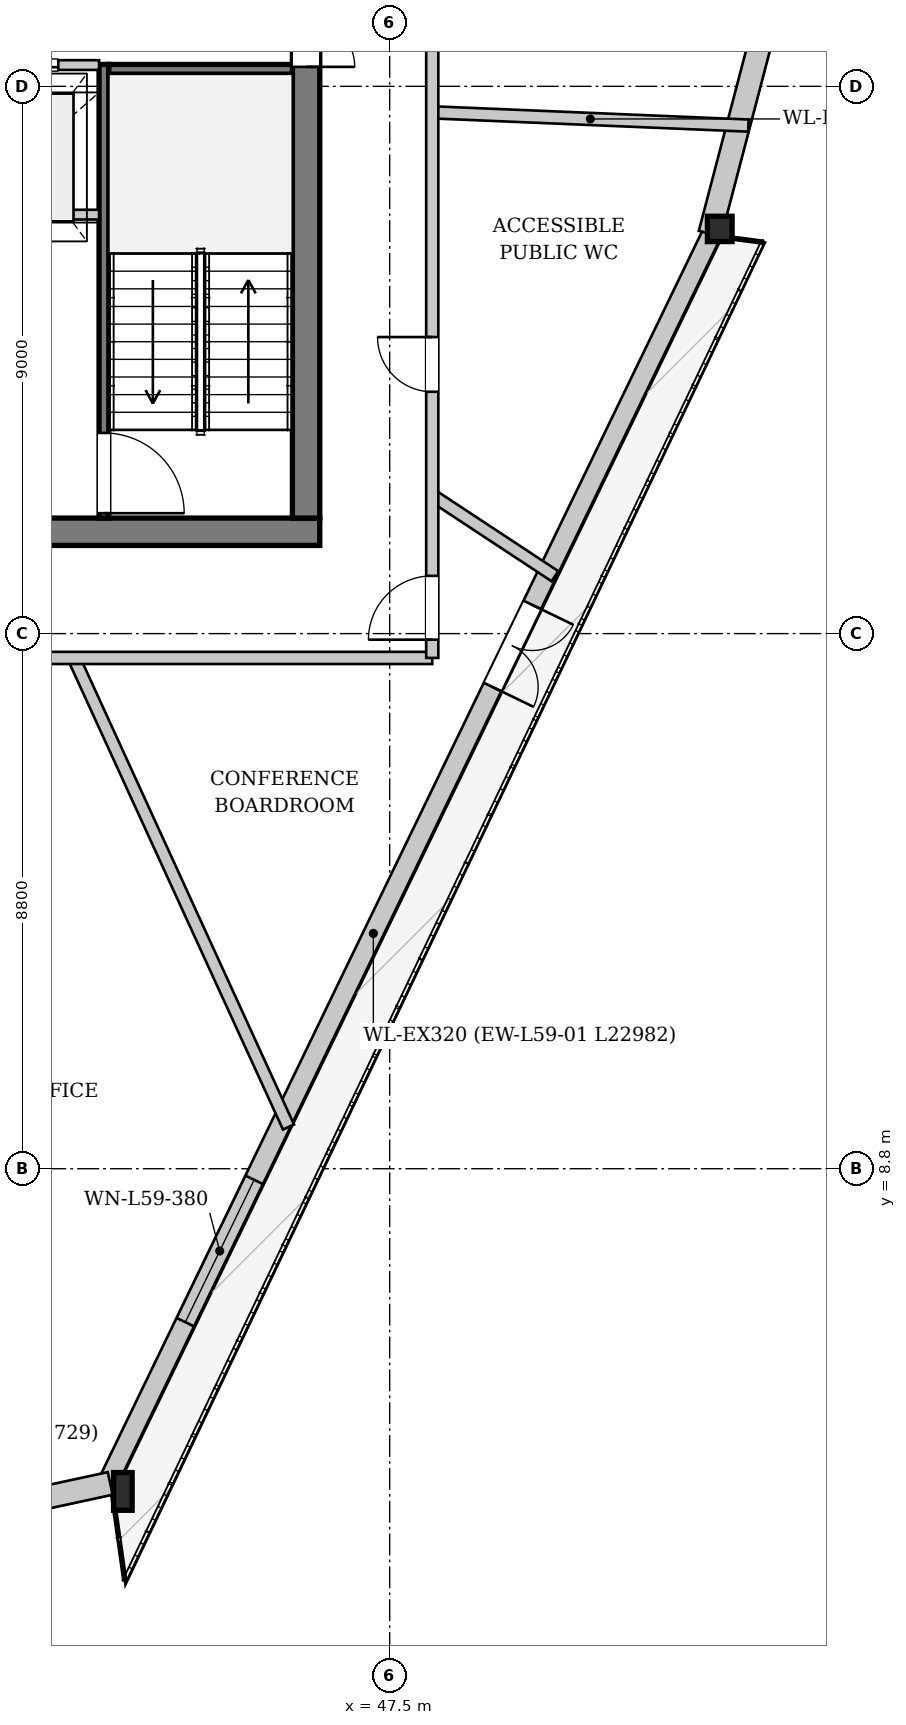
"""IFC4 building model, lengths in metres.
Left out: names, types, materials, properties, quantities, classifications, styles, units other than length and angle.
Written with IfcOpenShell. Run it as: python <this file> out.ifc"""

import sys

from ifc_helpers import new_model, si_unit, direction, frame, frame_2d, origin, origin_2d, place, context, subcontext, project, spatial, rectangle, i_section, extrude, source, transform, mapped, element, fill, save


model = new_model("IFC4")
c1 = context("Model", 3, precision=1e-05, world=origin(), true_north=direction((0.0, 1.0)))
c2 = subcontext(c1, "Body", "Model", "MODEL_VIEW")
j1 = project(units=[si_unit("LENGTHUNIT", "METRE"), si_unit("PLANEANGLEUNIT", "RADIAN")], contexts=[c1])
p1 = place(None, origin())
s1 = spatial("IfcSite", under=j1, at=p1, CompositionType="ELEMENT")
p2 = place(p1, origin())
s2 = spatial("IfcBuilding", under=s1, at=p2, CompositionType="ELEMENT")
p3 = place(p2, frame((0.0, 0.0, 223.8)))
s3 = spatial("IfcBuildingStorey", under=s2, at=p3, CompositionType="ELEMENT", Elevation=223.8)
m1 = source(origin(), c2, "Body", "SweptSolid", [
    extrude(i_section(OverallWidth=0.305, OverallDepth=0.62, WebThickness=0.021, FlangeThickness=0.04, at=origin_2d()), origin(), (0.0, 0.0, 1.0), 3.403),
])
p4 = place(p3, frame((42.944, 3.439, 0.0), z_axis=(0.098707447122, 0.031850368112, 0.99460665287), x_axis=(-0.307083610191, 0.951682539691, 0.0)))
e1 = element("IfcColumn", 1, at=p4, inside=s3, PredefinedType="COLUMN", context=c2, shape_type="MappedRepresentation", body=[
    mapped(m1, transform((0.0, 0.0, 0.0), x_axis=(1.0, 0.0, 0.0), y_axis=(0.0, 1.0, 0.0), z_axis=(0.0, 0.0, 1.0), scale=1.0)),
])
m2 = source(origin(), c2, "Body", "SweptSolid", [
    extrude(i_section(OverallWidth=0.406, OverallDepth=0.416, WebThickness=0.027, FlangeThickness=0.042, at=origin_2d()), origin(), (0.0, 0.0, 1.0), 3.395),
])
p5 = place(p3, frame((52.951, 24.127, 0.0), z_axis=(-0.013591343042, 0.075435549477, 0.997058049097), x_axis=(-0.984153867213, -0.177316569021, 0.0)))
e2 = element("IfcColumn", 2, at=p5, inside=s3, PredefinedType="COLUMN", context=c2, shape_type="MappedRepresentation", body=[
    mapped(m2, transform((0.0, 0.0, 0.0), x_axis=(1.0, 0.0, 0.0), y_axis=(0.0, 1.0, 0.0), z_axis=(0.0, 0.0, 1.0), scale=1.0)),
])
p6 = place(p3, frame((52.807, 24.197, 0.0), z_axis=(0.0, 0.0, 1.0), x_axis=(-0.435460131782, -0.900208016865, 0.0)))
e3 = element("IfcWall", 3, at=p6, inside=s3, PredefinedType="SOLIDWALL", context=c2, shape_type="SweptSolid", body=[
    extrude(rectangle(XDim=22.982, YDim=0.32, at=frame_2d((11.491, 0.0))), origin(), (0.0, 0.0, 1.0), 2.822),
])
p7 = place(p6, frame((6.804, 0.0, 0.0)))
e4 = element("IfcOpeningElement", 4, at=p7, cuts=e3, PredefinedType="OPENING", context=c2, shape_type="SweptSolid", body=[
    extrude(rectangle(XDim=1.5, YDim=2.3, at=frame_2d((0.75, 1.15))), frame((0.0, 0.17, 0.0), z_axis=(0.0, -1.0, 0.0), x_axis=(1.0, 0.0, 0.0)), (0.0, 0.0, 1.0), 0.34),
])
p8 = place(p6, frame((17.307, 0.0, 0.352)))
e5 = element("IfcOpeningElement", 5, at=p8, cuts=e3, PredefinedType="OPENING", context=c2, shape_type="SweptSolid", body=[
    extrude(rectangle(XDim=2.6, YDim=2.35, at=frame_2d((1.3, 1.175))), frame((0.0, 0.17, 0.0), z_axis=(0.0, -1.0, 0.0), x_axis=(1.0, 0.0, 0.0)), (0.0, 0.0, 1.0), 0.34),
])
p9 = place(p3, frame((42.903, 3.625, 0.0), z_axis=(0.0, 0.0, 1.0), x_axis=(-0.977406853857, -0.211366605765, 0.0)))
e6 = element("IfcWall", 6, at=p9, inside=s3, PredefinedType="SOLIDWALL", context=c2, shape_type="SweptSolid", body=[
    extrude(rectangle(XDim=3.729, YDim=0.38, at=frame_2d((1.864, 0.0))), origin(), (0.0, 0.0, 1.0), 2.822),
])
p10 = place(p3, frame((58.594, 46.407, 0.0), z_axis=(0.0, 0.0, 1.0), x_axis=(-0.253530518145, -0.96732738841, 0.0)))
e7 = element("IfcWall", 7, at=p10, inside=s3, PredefinedType="SOLIDWALL", context=c2, shape_type="SweptSolid", body=[
    extrude(rectangle(XDim=22.982, YDim=0.38, at=frame_2d((11.491, 0.0))), origin(), (0.0, 0.0, 1.0), 2.822),
])
p11 = place(p10, frame((5.335, 0.0, 0.452)))
e8 = element("IfcOpeningElement", 8, at=p11, cuts=e7, PredefinedType="OPENING", context=c2, shape_type="SweptSolid", body=[
    extrude(rectangle(XDim=2.2, YDim=2.25, at=frame_2d((1.1, 1.125))), frame((0.0, 0.2, 0.0), z_axis=(0.0, -1.0, 0.0), x_axis=(1.0, 0.0, 0.0)), (0.0, 0.0, 1.0), 0.4),
])
p12 = place(p10, frame((15.447, 0.0, 0.452)))
e9 = element("IfcOpeningElement", 9, at=p12, cuts=e7, PredefinedType="OPENING", context=c2, shape_type="SweptSolid", body=[
    extrude(rectangle(XDim=2.2, YDim=2.25, at=frame_2d((1.1, 1.125))), frame((0.0, 0.2, 0.0), z_axis=(0.0, -1.0, 0.0), x_axis=(1.0, 0.0, 0.0)), (0.0, 0.0, 1.0), 0.4),
])
p13 = place(p3, frame((46.35, 19.275, 0.0), z_axis=(0.0, 0.0, 1.0), x_axis=(-1.0, 0.0, 0.0)))
e10 = element("IfcWall", 10, at=p13, inside=s3, PredefinedType="SHEAR", context=c2, shape_type="SweptSolid", body=[
    extrude(rectangle(XDim=16.7, YDim=0.45, at=frame_2d((8.35, 0.0))), origin(), (0.0, 0.0, 1.0), 3.33),
])
p14 = place(p13, frame((4.55, 0.0, 0.0)))
e11 = element("IfcOpeningElement", 11, at=p14, cuts=e10, PredefinedType="OPENING", context=c2, shape_type="SweptSolid", body=[
    extrude(rectangle(XDim=1.12, YDim=2.25, at=frame_2d((0.56, 1.125))), frame((0.0, 0.235, 0.0), z_axis=(0.0, -1.0, 0.0), x_axis=(1.0, 0.0, 0.0)), (0.0, 0.0, 1.0), 0.47),
])
p15 = place(p13, frame((11.05, 0.0, 0.0)))
e12 = element("IfcOpeningElement", 12, at=p15, cuts=e10, PredefinedType="OPENING", context=c2, shape_type="SweptSolid", body=[
    extrude(rectangle(XDim=1.12, YDim=2.25, at=frame_2d((0.56, 1.125))), frame((0.0, 0.235, 0.0), z_axis=(0.0, -1.0, 0.0), x_axis=(1.0, 0.0, 0.0)), (0.0, 0.0, 1.0), 0.47),
])
p16 = place(p3, frame((46.125, 33.7, 0.0), z_axis=(0.0, 0.0, 1.0), x_axis=(0.0, -1.0, 0.0)))
e13 = element("IfcWall", 13, at=p16, inside=s3, PredefinedType="SHEAR", context=c2, shape_type="SweptSolid", body=[
    extrude(rectangle(XDim=14.2, YDim=0.45, at=frame_2d((7.1, 0.0))), origin(), (0.0, 0.0, 1.0), 3.33),
])
p17 = place(p16, frame((5.18, 0.0, 0.0)))
e14 = element("IfcOpeningElement", 14, at=p17, cuts=e13, PredefinedType="OPENING", context=c2, shape_type="SweptSolid", body=[
    extrude(rectangle(XDim=1.6, YDim=2.2, at=frame_2d((0.8, 1.1))), frame((0.0, 0.235, 0.0), z_axis=(0.0, -1.0, 0.0), x_axis=(1.0, 0.0, 0.0)), (0.0, 0.0, 1.0), 0.47),
])
p18 = place(p16, frame((2.05, 0.0, 0.0)))
e15 = element("IfcOpeningElement", 15, at=p18, cuts=e13, PredefinedType="OPENING", context=c2, shape_type="SweptSolid", body=[
    extrude(rectangle(XDim=0.95, YDim=2.1, at=frame_2d((0.475, 1.05))), frame((0.0, 0.235, 0.0), z_axis=(0.0, -1.0, 0.0), x_axis=(1.0, 0.0, 0.0)), (0.0, 0.0, 1.0), 0.47),
])
p19 = place(p3, frame((42.8, 26.96, 0.0), z_axis=(0.0, 0.0, 1.0), x_axis=(0.0, -1.0, 0.0)))
e16 = element("IfcWall", 16, at=p19, inside=s3, PredefinedType="PARTITIONING", context=c2, shape_type="SweptSolid", body=[
    extrude(rectangle(XDim=7.46, YDim=0.16, at=frame_2d((3.73, 0.0))), origin(), (0.0, 0.0, 1.0), 3.33),
])
p20 = place(p19, frame((6.06, 0.0, 0.0)))
e17 = element("IfcOpeningElement", 17, at=p20, cuts=e16, PredefinedType="OPENING", context=c2, shape_type="SweptSolid", body=[
    extrude(rectangle(XDim=1.32, YDim=2.2, at=frame_2d((0.66, 1.1))), frame((0.0, 0.09, 0.0), z_axis=(0.0, -1.0, 0.0), x_axis=(1.0, 0.0, 0.0)), (0.0, 0.0, 1.0), 0.18),
])
p21 = place(p3, frame((42.88, 26.88, 0.0), z_axis=(0.0, 0.0, 1.0), x_axis=(1.0, 0.0, 0.0)))
e18 = element("IfcWall", 18, at=p21, inside=s3, PredefinedType="PARTITIONING", context=c2, shape_type="SweptSolid", body=[
    extrude(rectangle(XDim=3.02, YDim=0.16, at=frame_2d((1.51, 0.0))), origin(), (0.0, 0.0, 1.0), 3.33),
])
p22 = place(p3, frame((33.28, 24.49, 0.0), z_axis=(0.0, 0.0, 1.0), x_axis=(1.0, 0.0, 0.0)))
e19 = element("IfcWall", 19, at=p22, inside=s3, PredefinedType="PARTITIONING", context=c2, shape_type="SweptSolid", body=[
    extrude(rectangle(XDim=9.44, YDim=0.16, at=frame_2d((4.72, 0.0))), origin(), (0.0, 0.0, 1.0), 3.33),
])
p23 = place(p3, frame((33.28, 26.95, 0.0), z_axis=(0.0, 0.0, 1.0), x_axis=(1.0, 0.0, 0.0)))
e20 = element("IfcWall", 20, at=p23, inside=s3, PredefinedType="PARTITIONING", context=c2, shape_type="SweptSolid", body=[
    extrude(rectangle(XDim=9.44, YDim=0.16, at=frame_2d((4.72, 0.0))), origin(), (0.0, 0.0, 1.0), 3.33),
])
p24 = place(p23, frame((1.2, 0.0, 0.0)))
e21 = element("IfcOpeningElement", 21, at=p24, cuts=e20, PredefinedType="OPENING", context=c2, shape_type="SweptSolid", body=[
    extrude(rectangle(XDim=0.95, YDim=2.1, at=frame_2d((0.475, 1.05))), frame((0.0, 0.09, 0.0), z_axis=(0.0, -1.0, 0.0), x_axis=(1.0, 0.0, 0.0)), (0.0, 0.0, 1.0), 0.18),
])
p25 = place(p23, frame((4.65, 0.0, 0.0)))
e22 = element("IfcOpeningElement", 22, at=p25, cuts=e20, PredefinedType="OPENING", context=c2, shape_type="SweptSolid", body=[
    extrude(rectangle(XDim=0.95, YDim=2.1, at=frame_2d((0.475, 1.05))), frame((0.0, 0.09, 0.0), z_axis=(0.0, -1.0, 0.0), x_axis=(1.0, 0.0, 0.0)), (0.0, 0.0, 1.0), 0.18),
])
p26 = place(p23, frame((7.67, 0.0, 0.0)))
e23 = element("IfcOpeningElement", 23, at=p26, cuts=e20, PredefinedType="OPENING", context=c2, shape_type="SweptSolid", body=[
    extrude(rectangle(XDim=1.1, YDim=2.2, at=frame_2d((0.55, 1.1))), frame((0.0, 0.09, 0.0), z_axis=(0.0, -1.0, 0.0), x_axis=(1.0, 0.0, 0.0)), (0.0, 0.0, 1.0), 0.18),
])
p27 = place(p3, frame((48.2, 26.173, 0.0), z_axis=(0.0, 0.0, 1.0), x_axis=(0.999121979666, -0.041895939512, 0.0)))
e24 = element("IfcWall", 24, at=p27, inside=s3, PredefinedType="PARTITIONING", context=c2, shape_type="SweptSolid", body=[
    extrude(rectangle(XDim=5.204, YDim=0.2, at=frame_2d((2.602, 0.0))), origin(), (0.0, 0.0, 1.0), 3.33),
])
p28 = place(p3, frame((42.304, 17.2, 0.0), z_axis=(0.0, 0.0, 1.0), x_axis=(0.416275176363, -0.909238680185, 0.0)))
e25 = element("IfcWall", 25, at=p28, inside=s3, PredefinedType="PARTITIONING", context=c2, shape_type="SweptSolid", body=[
    extrude(rectangle(XDim=8.484, YDim=0.2, at=frame_2d((4.242, 0.0))), origin(), (0.0, 0.0, 1.0), 3.33),
])
p29 = place(p3, frame((48.2, 19.874, 0.0), z_axis=(0.0, 0.0, 1.0), x_axis=(0.834868508207, -0.550449429107, 0.0)))
e26 = element("IfcWall", 26, at=p29, inside=s3, PredefinedType="PARTITIONING", context=c2, shape_type="SweptSolid", body=[
    extrude(rectangle(XDim=2.416, YDim=0.2, at=frame_2d((1.208, 0.0))), origin(), (0.0, 0.0, 1.0), 3.33),
])
p30 = place(p3, frame((27.8, 17.2, 0.0), z_axis=(0.0, 0.0, 1.0), x_axis=(1.0, 0.0, 0.0)))
e27 = element("IfcWall", 27, at=p30, inside=s3, PredefinedType="PARTITIONING", context=c2, shape_type="SweptSolid", body=[
    extrude(rectangle(XDim=20.4, YDim=0.2, at=frame_2d((10.2, 0.0))), origin(), (0.0, 0.0, 1.0), 3.33),
])
p31 = place(p30, frame((4.762, 0.0, 0.0)))
e28 = element("IfcOpeningElement", 28, at=p31, cuts=e27, PredefinedType="OPENING", context=c2, shape_type="SweptSolid", body=[
    extrude(rectangle(XDim=1.05, YDim=2.2, at=frame_2d((0.525, 1.1))), frame((0.0, 0.11, 0.0), z_axis=(0.0, -1.0, 0.0), x_axis=(1.0, 0.0, 0.0)), (0.0, 0.0, 1.0), 0.22),
])
p32 = place(p30, frame((11.71, 0.0, 0.0)))
e29 = element("IfcOpeningElement", 29, at=p32, cuts=e27, PredefinedType="OPENING", context=c2, shape_type="SweptSolid", body=[
    extrude(rectangle(XDim=1.05, YDim=2.2, at=frame_2d((0.525, 1.1))), frame((0.0, 0.11, 0.0), z_axis=(0.0, -1.0, 0.0), x_axis=(1.0, 0.0, 0.0)), (0.0, 0.0, 1.0), 0.22),
])
p33 = place(p3, frame((48.2, 17.2, 0.0), z_axis=(0.0, 0.0, 1.0), x_axis=(0.0, 1.0, 0.0)))
e30 = element("IfcWall", 30, at=p33, inside=s3, PredefinedType="PARTITIONING", context=c2, shape_type="SweptSolid", body=[
    extrude(rectangle(XDim=18.8, YDim=0.2, at=frame_2d((9.4, 0.0))), origin(), (0.0, 0.0, 1.0), 3.015),
])
p34 = place(p33, frame((11.705, 0.0, 0.0)))
e31 = element("IfcOpeningElement", 31, at=p34, cuts=e30, PredefinedType="OPENING", context=c2, shape_type="SweptSolid", body=[
    extrude(rectangle(XDim=1.05, YDim=2.2, at=frame_2d((0.525, 1.1))), frame((0.0, 0.11, 0.0), z_axis=(0.0, -1.0, 0.0), x_axis=(1.0, 0.0, 0.0)), (0.0, 0.0, 1.0), 0.22),
])
p35 = place(p33, frame((17.45, 0.0, 0.0)))
e32 = element("IfcOpeningElement", 32, at=p35, cuts=e30, PredefinedType="OPENING", context=c2, shape_type="SweptSolid", body=[
    extrude(rectangle(XDim=1.05, YDim=2.2, at=frame_2d((0.525, 1.1))), frame((0.0, 0.11, 0.0), z_axis=(0.0, -1.0, 0.0), x_axis=(1.0, 0.0, 0.0)), (0.0, 0.0, 1.0), 0.22),
])
p36 = place(p33, frame((0.3, 0.0, 0.0)))
e33 = element("IfcOpeningElement", 33, at=p36, cuts=e30, PredefinedType="OPENING", context=c2, shape_type="SweptSolid", body=[
    extrude(rectangle(XDim=1.05, YDim=2.2, at=frame_2d((0.525, 1.1))), frame((0.0, 0.11, 0.0), z_axis=(0.0, -1.0, 0.0), x_axis=(1.0, 0.0, 0.0)), (0.0, 0.0, 1.0), 0.22),
])
p37 = place(p33, frame((4.377, 0.0, 0.0)))
e34 = element("IfcOpeningElement", 34, at=p37, cuts=e30, PredefinedType="OPENING", context=c2, shape_type="SweptSolid", body=[
    extrude(rectangle(XDim=0.9, YDim=2.1, at=frame_2d((0.45, 1.05))), frame((0.0, 0.11, 0.0), z_axis=(0.0, -1.0, 0.0), x_axis=(1.0, 0.0, 0.0)), (0.0, 0.0, 1.0), 0.22),
])
m3 = source(origin(), c2, "Body", "SweptSolid", [
    extrude(rectangle(XDim=1.5, YDim=2.3, at=frame_2d((0.75, 1.15))), frame((0.0, 0.025, 0.0), z_axis=(0.0, -1.0, 0.0), x_axis=(1.0, 0.0, 0.0)), (0.0, 0.0, 1.0), 0.05),
])
p38 = place(p7, origin())
e35 = element("IfcDoor", 35, at=p38, inside=s3, OperationType="DOUBLE_DOOR_SINGLE_SWING", PredefinedType="DOOR", context=c2, shape_type="MappedRepresentation", body=[
    mapped(m3, transform((0.0, 0.0, 0.0), x_axis=(1.0, 0.0, 0.0), y_axis=(0.0, 1.0, 0.0), z_axis=(0.0, 0.0, 1.0), scale=1.0)),
])
fill(e4, e35)
m4 = source(origin(), c2, "Body", "SweptSolid", [
    extrude(rectangle(XDim=2.6, YDim=2.35, at=frame_2d((1.3, 1.175))), frame((0.0, 0.03, 0.0), z_axis=(0.0, -1.0, 0.0), x_axis=(1.0, 0.0, 0.0)), (0.0, 0.0, 1.0), 0.06),
])
p39 = place(p8, origin())
e36 = element("IfcWindow", 36, at=p39, inside=s3, PartitioningType="SINGLE_PANEL", PredefinedType="WINDOW", context=c2, shape_type="MappedRepresentation", body=[
    mapped(m4, transform((0.0, 0.0, 0.0), x_axis=(1.0, 0.0, 0.0), y_axis=(0.0, 1.0, 0.0), z_axis=(0.0, 0.0, 1.0), scale=1.0)),
])
fill(e5, e36)
m5 = source(origin(), c2, "Body", "SweptSolid", [
    extrude(rectangle(XDim=1.6, YDim=2.2, at=frame_2d((0.8, 1.1))), frame((0.0, 0.025, 0.0), z_axis=(0.0, -1.0, 0.0), x_axis=(1.0, 0.0, 0.0)), (0.0, 0.0, 1.0), 0.05),
])
p40 = place(p17, origin())
e37 = element("IfcDoor", 37, at=p40, inside=s3, OperationType="DOUBLE_DOOR_SINGLE_SWING", PredefinedType="DOOR", context=c2, shape_type="MappedRepresentation", body=[
    mapped(m5, transform((0.0, 0.0, 0.0), x_axis=(1.0, 0.0, 0.0), y_axis=(0.0, 1.0, 0.0), z_axis=(0.0, 0.0, 1.0), scale=1.0)),
])
fill(e14, e37)
m6 = source(origin(), c2, "Body", "SweptSolid", [
    extrude(rectangle(XDim=1.32, YDim=2.2, at=frame_2d((0.66, 1.1))), frame((0.0, 0.025, 0.0), z_axis=(0.0, -1.0, 0.0), x_axis=(1.0, 0.0, 0.0)), (0.0, 0.0, 1.0), 0.05),
])
p41 = place(p20, origin())
e38 = element("IfcDoor", 38, at=p41, inside=s3, OperationType="SINGLE_SWING_RIGHT", PredefinedType="DOOR", context=c2, shape_type="MappedRepresentation", body=[
    mapped(m6, transform((0.0, 0.0, 0.0), x_axis=(1.0, 0.0, 0.0), y_axis=(0.0, 1.0, 0.0), z_axis=(0.0, 0.0, 1.0), scale=1.0)),
])
fill(e17, e38)
m7 = source(origin(), c2, "Body", "SweptSolid", [
    extrude(rectangle(XDim=1.1, YDim=2.2, at=frame_2d((0.55, 1.1))), frame((0.0, 0.025, 0.0), z_axis=(0.0, -1.0, 0.0), x_axis=(1.0, 0.0, 0.0)), (0.0, 0.0, 1.0), 0.05),
])
p42 = place(p26, origin())
e39 = element("IfcDoor", 39, at=p42, inside=s3, OperationType="DOUBLE_DOOR_SLIDING", PredefinedType="DOOR", context=c2, shape_type="MappedRepresentation", body=[
    mapped(m7, transform((0.0, 0.0, 0.0), x_axis=(1.0, 0.0, 0.0), y_axis=(0.0, 1.0, 0.0), z_axis=(0.0, 0.0, 1.0), scale=1.0)),
])
fill(e23, e39)
m8 = source(origin(), c2, "Body", "SweptSolid", [
    extrude(rectangle(XDim=1.05, YDim=2.2, at=frame_2d((0.525, 1.1))), frame((0.0, 0.025, 0.0), z_axis=(0.0, -1.0, 0.0), x_axis=(1.0, 0.0, 0.0)), (0.0, 0.0, 1.0), 0.05),
])
p43 = place(p36, origin())
e40 = element("IfcDoor", 40, at=p43, inside=s3, OperationType="SINGLE_SWING_LEFT", PredefinedType="DOOR", context=c2, shape_type="MappedRepresentation", body=[
    mapped(m8, transform((0.0, 0.0, 0.0), x_axis=(1.0, 0.0, 0.0), y_axis=(0.0, 1.0, 0.0), z_axis=(0.0, 0.0, 1.0), scale=1.0)),
])
fill(e33, e40)
m9 = source(origin(), c2, "Body", "SweptSolid", [
    extrude(rectangle(XDim=0.9, YDim=2.1, at=frame_2d((0.45, 1.05))), frame((0.0, 0.025, 0.0), z_axis=(0.0, -1.0, 0.0), x_axis=(1.0, 0.0, 0.0)), (0.0, 0.0, 1.0), 0.05),
])
p44 = place(p37, origin())
e41 = element("IfcDoor", 41, at=p44, inside=s3, OperationType="SINGLE_SWING_RIGHT", PredefinedType="DOOR", context=c2, shape_type="MappedRepresentation", body=[
    mapped(m9, transform((0.0, 0.0, 0.0), x_axis=(1.0, 0.0, 0.0), y_axis=(0.0, 1.0, 0.0), z_axis=(0.0, 0.0, 1.0), scale=1.0)),
])
fill(e34, e41)
save(model, sys.argv[1])
